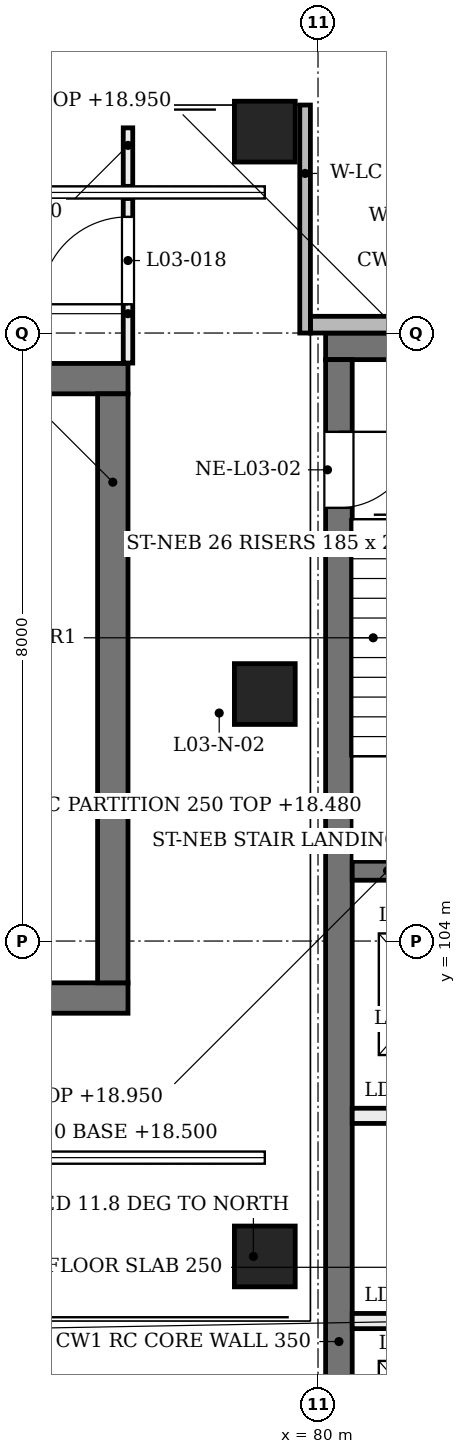
"""IFC4 building model, lengths in metres.
Left out: names, types, materials, properties, quantities, classifications, styles, units other than length and angle.
Written with IfcOpenShell. Run it as: python <this file> out.ifc"""

import sys

from ifc_helpers import new_model, si_unit, direction, frame, frame_2d, origin, origin_2d, place, context, subcontext, project, spatial, rectangle, extrude, element, fill, save


model = new_model("IFC4")
c1 = context("Model", 3, precision=1e-05, world=origin(), true_north=direction((0.0, 1.0)))
c2 = subcontext(c1, "Body", "Model", "MODEL_VIEW")
j1 = project(units=[si_unit("LENGTHUNIT", "METRE"), si_unit("PLANEANGLEUNIT", "RADIAN")], contexts=[c1])
p1 = place(None, origin())
s1 = spatial("IfcSite", under=j1, at=p1, CompositionType="ELEMENT")
p2 = place(p1, origin())
s2 = spatial("IfcBuilding", under=s1, at=p2, CompositionType="ELEMENT")
p3 = place(p2, frame((0.0, 0.0, 14.4)))
s3 = spatial("IfcBuildingStorey", under=s2, at=p3, CompositionType="ELEMENT", Elevation=14.4)
p4 = place(p3, frame((68.0, 103.25, 0.0), z_axis=(0.0, 0.0, 1.0), x_axis=(1.0, 0.0, 0.0)))
e1 = element("IfcWall", 1, at=p4, inside=s3, PredefinedType="SHEAR", context=c2, shape_type="SweptSolid", body=[
    extrude(rectangle(XDim=9.5, YDim=0.4, at=frame_2d((4.75, 0.0))), origin(), (0.0, 0.0, 1.0), 4.58),
])
p5 = place(p4, frame((1.25, 0.0, 0.0)))
e2 = element("IfcOpeningElement", 2, at=p5, cuts=e1, PredefinedType="OPENING", context=c2, shape_type="SweptSolid", body=[
    extrude(rectangle(XDim=1.05, YDim=2.2, at=frame_2d((0.525, 1.1))), frame((0.0, 0.21, 0.0), z_axis=(0.0, -1.0, 0.0), x_axis=(1.0, 0.0, 0.0)), (0.0, 0.0, 1.0), 0.42),
])
p6 = place(p4, frame((4.15, 0.0, 0.0)))
e3 = element("IfcOpeningElement", 3, at=p6, cuts=e1, PredefinedType="OPENING", context=c2, shape_type="SweptSolid", body=[
    extrude(rectangle(XDim=1.05, YDim=2.2, at=frame_2d((0.525, 1.1))), frame((0.0, 0.21, 0.0), z_axis=(0.0, -1.0, 0.0), x_axis=(1.0, 0.0, 0.0)), (0.0, 0.0, 1.0), 0.42),
])
p7 = place(p4, frame((7.05, 0.0, 0.0)))
e4 = element("IfcOpeningElement", 4, at=p7, cuts=e1, PredefinedType="OPENING", context=c2, shape_type="SweptSolid", body=[
    extrude(rectangle(XDim=1.05, YDim=2.2, at=frame_2d((0.525, 1.1))), frame((0.0, 0.21, 0.0), z_axis=(0.0, -1.0, 0.0), x_axis=(1.0, 0.0, 0.0)), (0.0, 0.0, 1.0), 0.42),
])
p8 = place(p3, frame((68.0, 111.4, 0.0), z_axis=(0.0, 0.0, 1.0), x_axis=(1.0, 0.0, 0.0)))
e5 = element("IfcWall", 5, at=p8, inside=s3, PredefinedType="SHEAR", context=c2, shape_type="SweptSolid", body=[
    extrude(rectangle(XDim=9.5, YDim=0.4, at=frame_2d((4.75, 0.0))), origin(), (0.0, 0.0, 1.0), 4.58),
])
p9 = place(p3, frame((77.3, 103.45, 0.0), z_axis=(0.0, 0.0, 1.0), x_axis=(0.0, 1.0, 0.0)))
e6 = element("IfcWall", 6, at=p9, inside=s3, PredefinedType="SHEAR", context=c2, shape_type="SweptSolid", body=[
    extrude(rectangle(XDim=7.75, YDim=0.4, at=frame_2d((3.875, 0.0))), origin(), (0.0, 0.0, 1.0), 4.58),
])
p10 = place(p3, frame((80.1, 111.825, 0.0), z_axis=(0.0, 0.0, 1.0), x_axis=(1.0, 0.0, 0.0)))
e7 = element("IfcWall", 7, at=p10, inside=s3, PredefinedType="SHEAR", context=c2, shape_type="SweptSolid", body=[
    extrude(rectangle(XDim=7.95, YDim=0.35, at=frame_2d((3.975, 0.0))), origin(), (0.0, 0.0, 1.0), 4.58),
])
p11 = place(p3, frame((80.275, 96.45, 0.0), z_axis=(0.0, 0.0, 1.0), x_axis=(0.0, 1.0, 0.0)))
e8 = element("IfcWall", 8, at=p11, inside=s3, PredefinedType="SHEAR", context=c2, shape_type="SweptSolid", body=[
    extrude(rectangle(XDim=15.2, YDim=0.35, at=frame_2d((7.6, 0.0))), origin(), (0.0, 0.0, 1.0), 4.58),
])
p12 = place(p11, frame((13.25, 0.0, 0.0)))
e9 = element("IfcOpeningElement", 9, at=p12, cuts=e8, PredefinedType="OPENING", context=c2, shape_type="SweptSolid", body=[
    extrude(rectangle(XDim=1.0, YDim=2.1, at=frame_2d((0.5, 1.05))), frame((0.0, 0.185, 0.0), z_axis=(0.0, -1.0, 0.0), x_axis=(1.0, 0.0, 0.0)), (0.0, 0.0, 1.0), 0.37),
])
for number, where, z_axis, x_axis in (
    (10, (79.3, 99.6, 0.0), (0.0, 0.204, 0.979), (-1.0, 0.0, 0.0)),
    (11, (79.3, 107.0, 0.0), (0.0, 0.204, 0.979), (-1.0, 0.0, 0.0)),
    (12, (79.3, 114.4, 0.0), (0.0, 0.204, 0.979), (-1.0, 0.0, 0.0)),
):
    element("IfcColumn", number, at=place(p3, frame(where, z_axis=z_axis, x_axis=x_axis)), inside=s3, PredefinedType="COLUMN", context=c2, shape_type="SweptSolid", body=[
        extrude(rectangle(XDim=0.8, YDim=0.8, at=origin_2d()), origin(), (0.0, 0.0, 1.0), 4.903),
    ])
for number, where, z_axis, x_axis in (
    (13, (72.2, 113.85, 4.1), (0.0, 0.0, 1.0), (1.0, 0.0, 0.0)),
    (14, (72.2, 101.15, 4.1), (0.0, 0.0, 1.0), (1.0, 0.0, 0.0)),
):
    element("IfcWall", number, at=place(p3, frame(where, z_axis=z_axis, x_axis=x_axis)), inside=s3, PredefinedType="SOLIDWALL", context=c2, shape_type="SweptSolid", body=[
        extrude(rectangle(XDim=6.9, YDim=0.15, at=frame_2d((3.45, 0.0))), origin(), (0.0, 0.0, 1.0), 0.48),
    ])
p13 = place(p3, frame((79.9, 112.11, 0.0), z_axis=(0.0, 0.0, 1.0), x_axis=(1.0, 0.0, 0.0)))
e15 = element("IfcWall", 15, at=p13, inside=s3, PredefinedType="SOLIDWALL", context=c2, shape_type="SweptSolid", body=[
    extrude(rectangle(XDim=8.2, YDim=0.22, at=frame_2d((4.1, 0.0))), origin(), (0.0, 0.0, 1.0), 3.9),
])
p14 = place(p13, frame((1.308, 0.0, 0.9)))
e16 = element("IfcOpeningElement", 16, at=p14, cuts=e15, PredefinedType="OPENING", context=c2, shape_type="SweptSolid", body=[
    extrude(rectangle(XDim=0.45, YDim=2.6, at=frame_2d((0.225, 1.3))), frame((0.0, 0.12, 0.0), z_axis=(0.0, -1.0, 0.0), x_axis=(1.0, 0.0, 0.0)), (0.0, 0.0, 1.0), 0.24),
])
p15 = place(p13, frame((3.975, 0.0, 0.9)))
e17 = element("IfcOpeningElement", 17, at=p15, cuts=e15, PredefinedType="OPENING", context=c2, shape_type="SweptSolid", body=[
    extrude(rectangle(XDim=0.45, YDim=2.6, at=frame_2d((0.225, 1.3))), frame((0.0, 0.12, 0.0), z_axis=(0.0, -1.0, 0.0), x_axis=(1.0, 0.0, 0.0)), (0.0, 0.0, 1.0), 0.24),
])
p16 = place(p13, frame((6.642, 0.0, 0.9)))
e18 = element("IfcOpeningElement", 18, at=p16, cuts=e15, PredefinedType="OPENING", context=c2, shape_type="SweptSolid", body=[
    extrude(rectangle(XDim=0.45, YDim=2.6, at=frame_2d((0.225, 1.3))), frame((0.0, 0.12, 0.0), z_axis=(0.0, -1.0, 0.0), x_axis=(1.0, 0.0, 0.0)), (0.0, 0.0, 1.0), 0.24),
])
p17 = place(p3, frame((79.83, 112.0, 0.0), z_axis=(0.0, 0.0, 1.0), x_axis=(0.0, 1.0, 0.0)))
e19 = element("IfcWall", 19, at=p17, inside=s3, PredefinedType="SOLIDWALL", context=c2, shape_type="SweptSolid", body=[
    extrude(rectangle(XDim=3.0, YDim=0.14, at=frame_2d((1.5, 0.0))), origin(), (0.0, 0.0, 1.0), 3.9),
])
p18 = place(p3, frame((83.55, 104.925, 0.0), z_axis=(0.0, 0.0, 1.0), x_axis=(-1.0, 0.0, 0.0)))
e20 = element("IfcWall", 20, at=p18, inside=s3, PredefinedType="SOLIDWALL", context=c2, shape_type="SweptSolid", body=[
    extrude(rectangle(XDim=3.1, YDim=0.25, at=frame_2d((1.55, 0.0))), origin(), (0.0, 0.0, 1.0), 4.55),
])
p19 = place(p3, frame((87.65, 101.7, 0.0), z_axis=(0.0, 0.0, 1.0), x_axis=(-1.0, 0.0, 0.0)))
e21 = element("IfcWall", 21, at=p19, inside=s3, PredefinedType="SOLIDWALL", context=c2, shape_type="SweptSolid", body=[
    extrude(rectangle(XDim=7.2, YDim=0.2, at=frame_2d((3.6, 0.0))), origin(), (0.0, 0.0, 1.0), 4.55),
])
p20 = place(p19, frame((0.5, 0.0, 0.0)))
e22 = element("IfcOpeningElement", 22, at=p20, cuts=e21, PredefinedType="OPENING", context=c2, shape_type="SweptSolid", body=[
    extrude(rectangle(XDim=1.1, YDim=2.1, at=frame_2d((0.55, 1.05))), frame((0.0, 0.11, 0.0), z_axis=(0.0, -1.0, 0.0), x_axis=(1.0, 0.0, 0.0)), (0.0, 0.0, 1.0), 0.22),
])
p21 = place(p19, frame((5.6, 0.0, 0.0)))
e23 = element("IfcOpeningElement", 23, at=p21, cuts=e21, PredefinedType="OPENING", context=c2, shape_type="SweptSolid", body=[
    extrude(rectangle(XDim=1.1, YDim=2.1, at=frame_2d((0.55, 1.05))), frame((0.0, 0.11, 0.0), z_axis=(0.0, -1.0, 0.0), x_axis=(1.0, 0.0, 0.0)), (0.0, 0.0, 1.0), 0.22),
])
p22 = place(p19, frame((3.1, 0.0, 0.0)))
e24 = element("IfcOpeningElement", 24, at=p22, cuts=e21, PredefinedType="OPENING", context=c2, shape_type="SweptSolid", body=[
    extrude(rectangle(XDim=1.0, YDim=2.1, at=frame_2d((0.5, 1.05))), frame((0.0, 0.11, 0.0), z_axis=(0.0, -1.0, 0.0), x_axis=(1.0, 0.0, 0.0)), (0.0, 0.0, 1.0), 0.22),
])
p23 = place(p3, frame((87.65, 99.0, 0.0), z_axis=(0.0, 0.0, 1.0), x_axis=(-1.0, 0.0, 0.0)))
e25 = element("IfcWall", 25, at=p23, inside=s3, PredefinedType="SOLIDWALL", context=c2, shape_type="SweptSolid", body=[
    extrude(rectangle(XDim=7.2, YDim=0.2, at=frame_2d((3.6, 0.0))), origin(), (0.0, 0.0, 1.0), 4.55),
])
p24 = place(p23, frame((0.5, 0.0, 0.0)))
e26 = element("IfcOpeningElement", 26, at=p24, cuts=e25, PredefinedType="OPENING", context=c2, shape_type="SweptSolid", body=[
    extrude(rectangle(XDim=1.1, YDim=2.1, at=frame_2d((0.55, 1.05))), frame((0.0, 0.11, 0.0), z_axis=(0.0, -1.0, 0.0), x_axis=(1.0, 0.0, 0.0)), (0.0, 0.0, 1.0), 0.22),
])
p25 = place(p23, frame((5.6, 0.0, 0.0)))
e27 = element("IfcOpeningElement", 27, at=p25, cuts=e25, PredefinedType="OPENING", context=c2, shape_type="SweptSolid", body=[
    extrude(rectangle(XDim=1.1, YDim=2.1, at=frame_2d((0.55, 1.05))), frame((0.0, 0.11, 0.0), z_axis=(0.0, -1.0, 0.0), x_axis=(1.0, 0.0, 0.0)), (0.0, 0.0, 1.0), 0.22),
])
p26 = place(p23, frame((3.1, 0.0, 0.0)))
e28 = element("IfcOpeningElement", 28, at=p26, cuts=e25, PredefinedType="OPENING", context=c2, shape_type="SweptSolid", body=[
    extrude(rectangle(XDim=1.0, YDim=2.1, at=frame_2d((0.5, 1.05))), frame((0.0, 0.11, 0.0), z_axis=(0.0, -1.0, 0.0), x_axis=(1.0, 0.0, 0.0)), (0.0, 0.0, 1.0), 0.22),
])
p27 = place(p3, frame((77.5, 111.605, 0.0), z_axis=(0.0, 0.0, 1.0), x_axis=(0.0, 1.0, 0.0)))
e29 = element("IfcWall", 29, at=p27, inside=s3, PredefinedType="PARTITIONING", context=c2, shape_type="SweptSolid", body=[
    extrude(rectangle(XDim=2.165, YDim=0.125, at=frame_2d((1.083, 0.0))), origin(), (0.0, 0.0, 1.0), 4.56),
])
p28 = place(p27, frame((0.774, 0.0, 0.0)))
e30 = element("IfcOpeningElement", 30, at=p28, cuts=e29, PredefinedType="OPENING", context=c2, shape_type="SweptSolid", body=[
    extrude(rectangle(XDim=1.15, YDim=2.1, at=frame_2d((0.575, 1.05))), frame((0.0, 0.073, 0.0), z_axis=(0.0, -1.0, 0.0), x_axis=(1.0, 0.0, 0.0)), (0.0, 0.0, 1.0), 0.145),
])
p29 = place(p3, frame((77.5, 113.93, 0.0), z_axis=(0.0, 0.0, 1.0), x_axis=(0.0, 1.0, 0.0)))
e31 = element("IfcWall", 31, at=p29, inside=s3, PredefinedType="PARTITIONING", context=c2, shape_type="SweptSolid", body=[
    extrude(rectangle(XDim=0.77, YDim=0.125, at=frame_2d((0.385, 0.0))), origin(), (0.0, 0.0, 1.0), 4.56),
])
p30 = place(p12, origin())
e32 = element("IfcDoor", 32, at=p30, inside=s3, OperationType="SINGLE_SWING_RIGHT", PredefinedType="DOOR", context=c2, shape_type="SweptSolid", body=[
    extrude(rectangle(XDim=1.0, YDim=2.1, at=frame_2d((0.5, 1.05))), frame((0.0, 0.025, 0.0), z_axis=(0.0, -1.0, 0.0), x_axis=(1.0, 0.0, 0.0)), (0.0, 0.0, 1.0), 0.05),
])
fill(e9, e32)
p31 = place(p28, origin())
e33 = element("IfcDoor", 33, at=p31, inside=s3, OperationType="SINGLE_SWING_LEFT", PredefinedType="DOOR", context=c2, shape_type="SweptSolid", body=[
    extrude(rectangle(XDim=1.15, YDim=2.1, at=frame_2d((0.575, 1.05))), frame((0.0, 0.025, 0.0), z_axis=(0.0, -1.0, 0.0), x_axis=(1.0, 0.0, 0.0)), (0.0, 0.0, 1.0), 0.05),
])
fill(e30, e33)
save(model, sys.argv[1])
